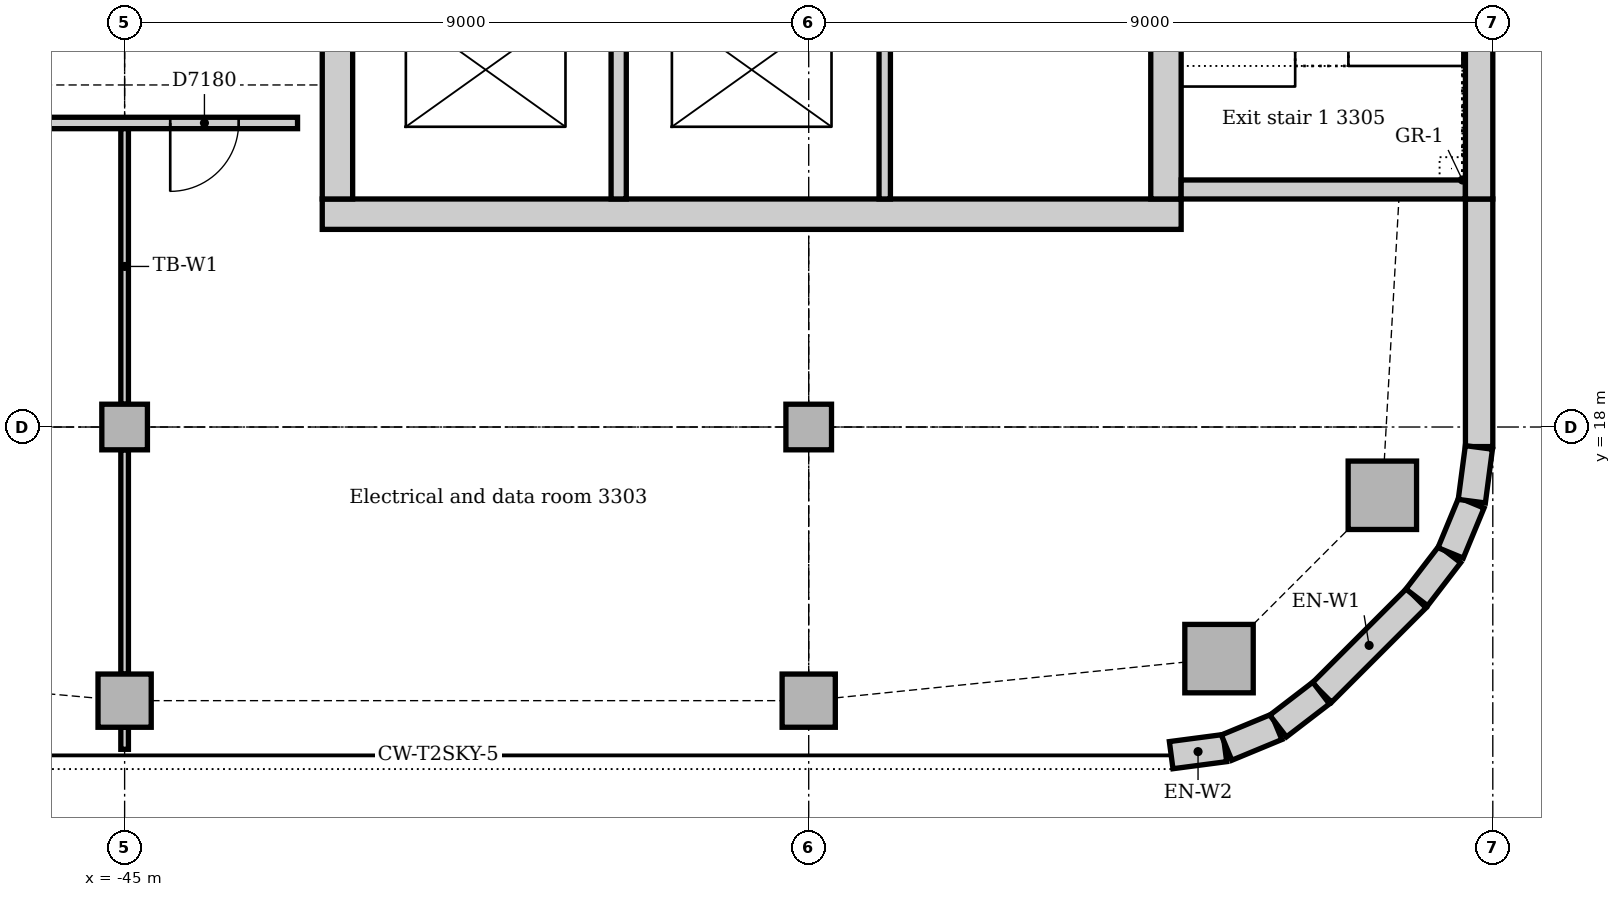
"""IFC4 building model, lengths in metres.
Left out: names, types, materials, properties, quantities, classifications, styles, units other than length and angle.
Written with IfcOpenShell. Run it as: python <this file> out.ifc"""

import sys

from ifc_helpers import new_model, si_unit, direction, frame, frame_2d, origin, origin_2d, place, context, subcontext, project, spatial, rectangle, extrude, element, fill, save


model = new_model("IFC4")
c1 = context("Model", 3, precision=1e-05, world=origin(), true_north=direction((0.0, 1.0)))
c2 = subcontext(c1, "Body", "Model", "MODEL_VIEW")
j1 = project(units=[si_unit("LENGTHUNIT", "METRE"), si_unit("PLANEANGLEUNIT", "RADIAN")], contexts=[c1])
p1 = place(None, origin())
s1 = spatial("IfcSite", under=j1, at=p1, CompositionType="ELEMENT")
p2 = place(p1, origin())
s2 = spatial("IfcBuilding", under=s1, at=p2, CompositionType="ELEMENT")
p3 = place(p2, frame((0.0, 0.0, 140.0)))
s3 = spatial("IfcBuildingStorey", under=s2, at=p3, CompositionType="ELEMENT", Elevation=140.0)
p4 = place(p3, frame((-42.4, 20.8, 0.0), z_axis=(0.0, 0.0, 1.0), x_axis=(1.0, 0.0, 0.0)))
e1 = element("IfcWall", 1, at=p4, inside=s3, PredefinedType="SOLIDWALL", context=c2, shape_type="SweptSolid", body=[
    extrude(rectangle(XDim=11.3, YDim=0.4, at=frame_2d((5.65, 0.0))), origin(), (0.0, 0.0, 1.0), 3.7),
])
p5 = place(p3, frame((-31.3, 21.0, 0.0), z_axis=(0.0, 0.0, 1.0), x_axis=(0.0, 1.0, 0.0)))
e2 = element("IfcWall", 2, at=p5, inside=s3, PredefinedType="SOLIDWALL", context=c2, shape_type="SweptSolid", body=[
    extrude(rectangle(XDim=9.5, YDim=0.4, at=frame_2d((4.75, 0.0))), origin(), (0.0, 0.0, 1.0), 3.7),
])
p6 = place(p5, frame((5.25, 0.0, 0.0)))
e3 = element("IfcOpeningElement", 3, at=p6, cuts=e2, PredefinedType="OPENING", context=c2, shape_type="SweptSolid", body=[
    extrude(rectangle(XDim=1.0, YDim=2.1, at=frame_2d((0.5, 1.05))), frame((0.0, 0.21, 0.0), z_axis=(0.0, -1.0, 0.0), x_axis=(1.0, 0.0, 0.0)), (0.0, 0.0, 1.0), 0.42),
])
p7 = place(p3, frame((-42.2, 30.5, 0.0), z_axis=(0.0, 0.0, 1.0), x_axis=(0.0, -1.0, 0.0)))
e4 = element("IfcWall", 4, at=p7, inside=s3, PredefinedType="SOLIDWALL", context=c2, shape_type="SweptSolid", body=[
    extrude(rectangle(XDim=9.5, YDim=0.4, at=frame_2d((4.75, 0.0))), origin(), (0.0, 0.0, 1.0), 3.7),
])
p8 = place(p7, frame((3.85, 0.0, 0.0)))
e5 = element("IfcOpeningElement", 5, at=p8, cuts=e4, PredefinedType="OPENING", context=c2, shape_type="SweptSolid", body=[
    extrude(rectangle(XDim=1.8, YDim=2.1, at=frame_2d((0.9, 1.05))), frame((0.0, 0.21, 0.0), z_axis=(0.0, -1.0, 0.0), x_axis=(1.0, 0.0, 0.0)), (0.0, 0.0, 1.0), 0.42),
])
p9 = place(p3, frame((-31.1, 21.125, 0.0), z_axis=(0.0, 0.0, 1.0), x_axis=(1.0, 0.0, 0.0)))
e6 = element("IfcWall", 6, at=p9, inside=s3, PredefinedType="SOLIDWALL", context=c2, shape_type="SweptSolid", body=[
    extrude(rectangle(XDim=3.74, YDim=0.25, at=frame_2d((1.87, 0.0))), origin(), (0.0, 0.0, 1.0), 3.7),
])
for number, where, z_axis, x_axis in (
    (7, (-30.602, 14.953, 0.0), (0.0, 0.0, 1.0), (1.0, 0.0, 0.0)),
    (8, (-28.453, 17.102, 0.0), (0.0, 0.0, 1.0), (1.0, 0.0, 0.0)),
):
    element("IfcColumn", number, at=place(p3, frame(where, z_axis=z_axis, x_axis=x_axis)), inside=s3, PredefinedType="COLUMN", context=c2, shape_type="SweptSolid", body=[
        extrude(rectangle(XDim=0.9, YDim=0.9, at=origin_2d()), origin(), (0.0, 0.0, 1.0), 3.7),
    ])
for number, where, z_axis, x_axis in (
    (9, (-45.0, 14.4, 0.0), (0.0, 0.0, 1.0), (1.0, 0.0, 0.0)),
    (10, (-36.0, 14.4, 0.0), (0.0, 0.0, 1.0), (1.0, 0.0, 0.0)),
):
    element("IfcColumn", number, at=place(p3, frame(where, z_axis=z_axis, x_axis=x_axis)), inside=s3, PredefinedType="COLUMN", context=c2, shape_type="SweptSolid", body=[
        extrude(rectangle(XDim=0.7, YDim=0.7, at=origin_2d()), origin(), (0.0, 0.0, 1.0), 3.7),
    ])
for number, where, z_axis, x_axis in (
    (11, (-45.0, 18.0, 0.0), (0.0, 0.0, 1.0), (1.0, 0.0, 0.0)),
    (12, (-36.0, 18.0, 0.0), (0.0, 0.0, 1.0), (1.0, 0.0, 0.0)),
):
    element("IfcColumn", number, at=place(p3, frame(where, z_axis=z_axis, x_axis=x_axis)), inside=s3, PredefinedType="COLUMN", context=c2, shape_type="SweptSolid", body=[
        extrude(rectangle(XDim=0.6, YDim=0.6, at=origin_2d()), origin(), (0.0, 0.0, 1.0), 3.7),
    ])
p10 = place(p3, frame((-29.249, 14.506, 0.0), z_axis=(0.0, 0.0, 1.0), x_axis=(0.707106781187, 0.707106781187, 0.0)))
e13 = element("IfcWall", 13, at=p10, inside=s3, PredefinedType="STANDARD", context=c2, shape_type="SweptSolid", body=[
    extrude(rectangle(XDim=1.757, YDim=0.36, at=frame_2d((0.879, 0.0))), origin(), (0.0, 0.0, 1.0), 3.7),
])
p11 = place(p3, frame((-27.18, 17.743, 0.0), z_axis=(0.0, 0.0, 1.0), x_axis=(0.0, 1.0, 0.0)))
e14 = element("IfcWall", 14, at=p11, inside=s3, PredefinedType="STANDARD", context=c2, shape_type="SweptSolid", body=[
    extrude(rectangle(XDim=3.257, YDim=0.36, at=frame_2d((1.629, 0.0))), origin(), (0.0, 0.0, 1.0), 3.7),
])
p12 = place(p3, frame((-27.18, 21.0, 0.0), z_axis=(0.0, 0.0, 1.0), x_axis=(0.0, 1.0, 0.0)))
e15 = element("IfcWall", 15, at=p12, inside=s3, PredefinedType="STANDARD", context=c2, shape_type="SweptSolid", body=[
    extrude(rectangle(XDim=6.75, YDim=0.36, at=frame_2d((3.375, 0.0))), origin(), (0.0, 0.0, 1.0), 3.7),
])
for number, where, z_axis, x_axis in (
    (16, (-31.231, 13.683, 0.0), (0.0, 0.0, 1.0), (0.991, 0.131, 0.0)),
    (17, (-30.503, 13.782, 0.0), (0.0, 0.0, 1.0), (0.924, 0.383, 0.0)),
):
    element("IfcWall", number, at=place(p3, frame(where, z_axis=z_axis, x_axis=x_axis)), inside=s3, PredefinedType="STANDARD", context=c2, shape_type="SweptSolid", body=[
        extrude(rectangle(XDim=0.713, YDim=0.36, at=frame_2d((0.356, 0.0))), origin(), (0.0, 0.0, 1.0), 3.7),
    ])
for number, where, z_axis, x_axis in (
    (18, (-29.825, 14.066, 0.0), (0.0, 0.0, 1.0), (0.793, 0.609, 0.0)),
    (19, (-28.0, 15.759, 0.0), (0.0, 0.0, 1.0), (0.609, 0.793, 0.0)),
):
    element("IfcWall", number, at=place(p3, frame(where, z_axis=z_axis, x_axis=x_axis)), inside=s3, PredefinedType="STANDARD", context=c2, shape_type="SweptSolid", body=[
        extrude(rectangle(XDim=0.713, YDim=0.36, at=frame_2d((0.357, 0.0))), origin(), (0.0, 0.0, 1.0), 3.7),
    ])
for number, where, z_axis, x_axis in (
    (20, (-27.555, 16.344, 0.0), (0.0, 0.0, 1.0), (0.383, 0.924, 0.0)),
    (21, (-27.276, 17.024, 0.0), (0.0, 0.0, 1.0), (0.131, 0.991, 0.0)),
):
    element("IfcWall", number, at=place(p3, frame(where, z_axis=z_axis, x_axis=x_axis)), inside=s3, PredefinedType="STANDARD", context=c2, shape_type="SweptSolid", body=[
        extrude(rectangle(XDim=0.713, YDim=0.36, at=frame_2d((0.356, 0.0))), origin(), (0.0, 0.0, 1.0), 3.7),
    ])
p13 = place(p3, frame((-38.5, 21.0, 0.0), z_axis=(0.0, 0.0, 1.0), x_axis=(0.0, 1.0, 0.0)))
e22 = element("IfcWall", 22, at=p13, inside=s3, PredefinedType="SOLIDWALL", context=c2, shape_type="SweptSolid", body=[
    extrude(rectangle(XDim=3.1, YDim=0.2, at=frame_2d((1.55, 0.0))), origin(), (0.0, 0.0, 1.0), 3.55),
])
p14 = place(p3, frame((-35.0, 21.0, 0.0), z_axis=(0.0, 0.0, 1.0), x_axis=(0.0, 1.0, 0.0)))
e23 = element("IfcWall", 23, at=p14, inside=s3, PredefinedType="SOLIDWALL", context=c2, shape_type="SweptSolid", body=[
    extrude(rectangle(XDim=2.9, YDim=0.15, at=frame_2d((1.45, 0.0))), origin(), (0.0, 0.0, 1.0), 3.55),
])
p15 = place(p3, frame((-59.766, 22.0, 0.0), z_axis=(0.0, 0.0, 1.0), x_axis=(1.0, 0.0, 0.0)))
e24 = element("IfcWall", 24, at=p15, inside=s3, PredefinedType="PARTITIONING", context=c2, shape_type="SweptSolid", body=[
    extrude(rectangle(XDim=17.041, YDim=0.15, at=frame_2d((8.52, 0.0))), origin(), (0.0, 0.0, 1.0), 3.55),
])
p16 = place(p15, frame((15.366, 0.0, 0.0)))
e25 = element("IfcOpeningElement", 25, at=p16, cuts=e24, PredefinedType="OPENING", context=c2, shape_type="SweptSolid", body=[
    extrude(rectangle(XDim=0.9, YDim=2.1, at=frame_2d((0.45, 1.05))), frame((0.0, 0.085, 0.0), z_axis=(0.0, -1.0, 0.0), x_axis=(1.0, 0.0, 0.0)), (0.0, 0.0, 1.0), 0.17),
])
p17 = place(p15, frame((2.5, 0.0, 0.0)))
e26 = element("IfcOpeningElement", 26, at=p17, cuts=e24, PredefinedType="OPENING", context=c2, shape_type="SweptSolid", body=[
    extrude(rectangle(XDim=0.9, YDim=2.1, at=frame_2d((0.45, 1.05))), frame((0.0, 0.085, 0.0), z_axis=(0.0, -1.0, 0.0), x_axis=(1.0, 0.0, 0.0)), (0.0, 0.0, 1.0), 0.17),
])
p18 = place(p15, frame((9.366, 0.0, 0.0)))
e27 = element("IfcOpeningElement", 27, at=p18, cuts=e24, PredefinedType="OPENING", context=c2, shape_type="SweptSolid", body=[
    extrude(rectangle(XDim=1.8, YDim=2.1, at=frame_2d((0.9, 1.05))), frame((0.0, 0.085, 0.0), z_axis=(0.0, -1.0, 0.0), x_axis=(1.0, 0.0, 0.0)), (0.0, 0.0, 1.0), 0.17),
])
p19 = place(p3, frame((-45.0, 18.3, 0.0), z_axis=(0.0, 0.0, 1.0), x_axis=(0.0, 1.0, 0.0)))
e28 = element("IfcWall", 28, at=p19, inside=s3, PredefinedType="PARTITIONING", context=c2, shape_type="SweptSolid", body=[
    extrude(rectangle(XDim=3.625, YDim=0.1, at=frame_2d((1.812, 0.0))), origin(), (0.0, 0.0, 1.0), 3.062),
])
p20 = place(p3, frame((-45.0, 14.75, 0.0), z_axis=(0.0, 0.0, 1.0), x_axis=(0.0, 1.0, 0.0)))
e29 = element("IfcWall", 29, at=p20, inside=s3, PredefinedType="PARTITIONING", context=c2, shape_type="SweptSolid", body=[
    extrude(rectangle(XDim=2.95, YDim=0.1, at=frame_2d((1.475, 0.0))), origin(), (0.0, 0.0, 1.0), 3.352),
])
p21 = place(p3, frame((-45.0, 13.76, 0.0), z_axis=(0.0, 0.0, 1.0), x_axis=(0.0, 1.0, 0.0)))
e30 = element("IfcWall", 30, at=p21, inside=s3, PredefinedType="PARTITIONING", context=c2, shape_type="SweptSolid", body=[
    extrude(rectangle(XDim=0.29, YDim=0.1, at=frame_2d((0.145, 0.0))), origin(), (0.0, 0.0, 1.0), 3.55),
])
p22 = place(p16, frame((0.9, 0.0, 0.0), z_axis=(0.0, 0.0, 1.0), x_axis=(-1.0, 0.0, 0.0)))
e31 = element("IfcDoor", 31, at=p22, inside=s3, OperationType="SINGLE_SWING_RIGHT", PredefinedType="DOOR", context=c2, shape_type="SweptSolid", body=[
    extrude(rectangle(XDim=0.9, YDim=2.1, at=frame_2d((0.45, 1.05))), frame((0.0, 0.025, 0.0), z_axis=(0.0, -1.0, 0.0), x_axis=(1.0, 0.0, 0.0)), (0.0, 0.0, 1.0), 0.05),
])
fill(e25, e31)
save(model, sys.argv[1])
